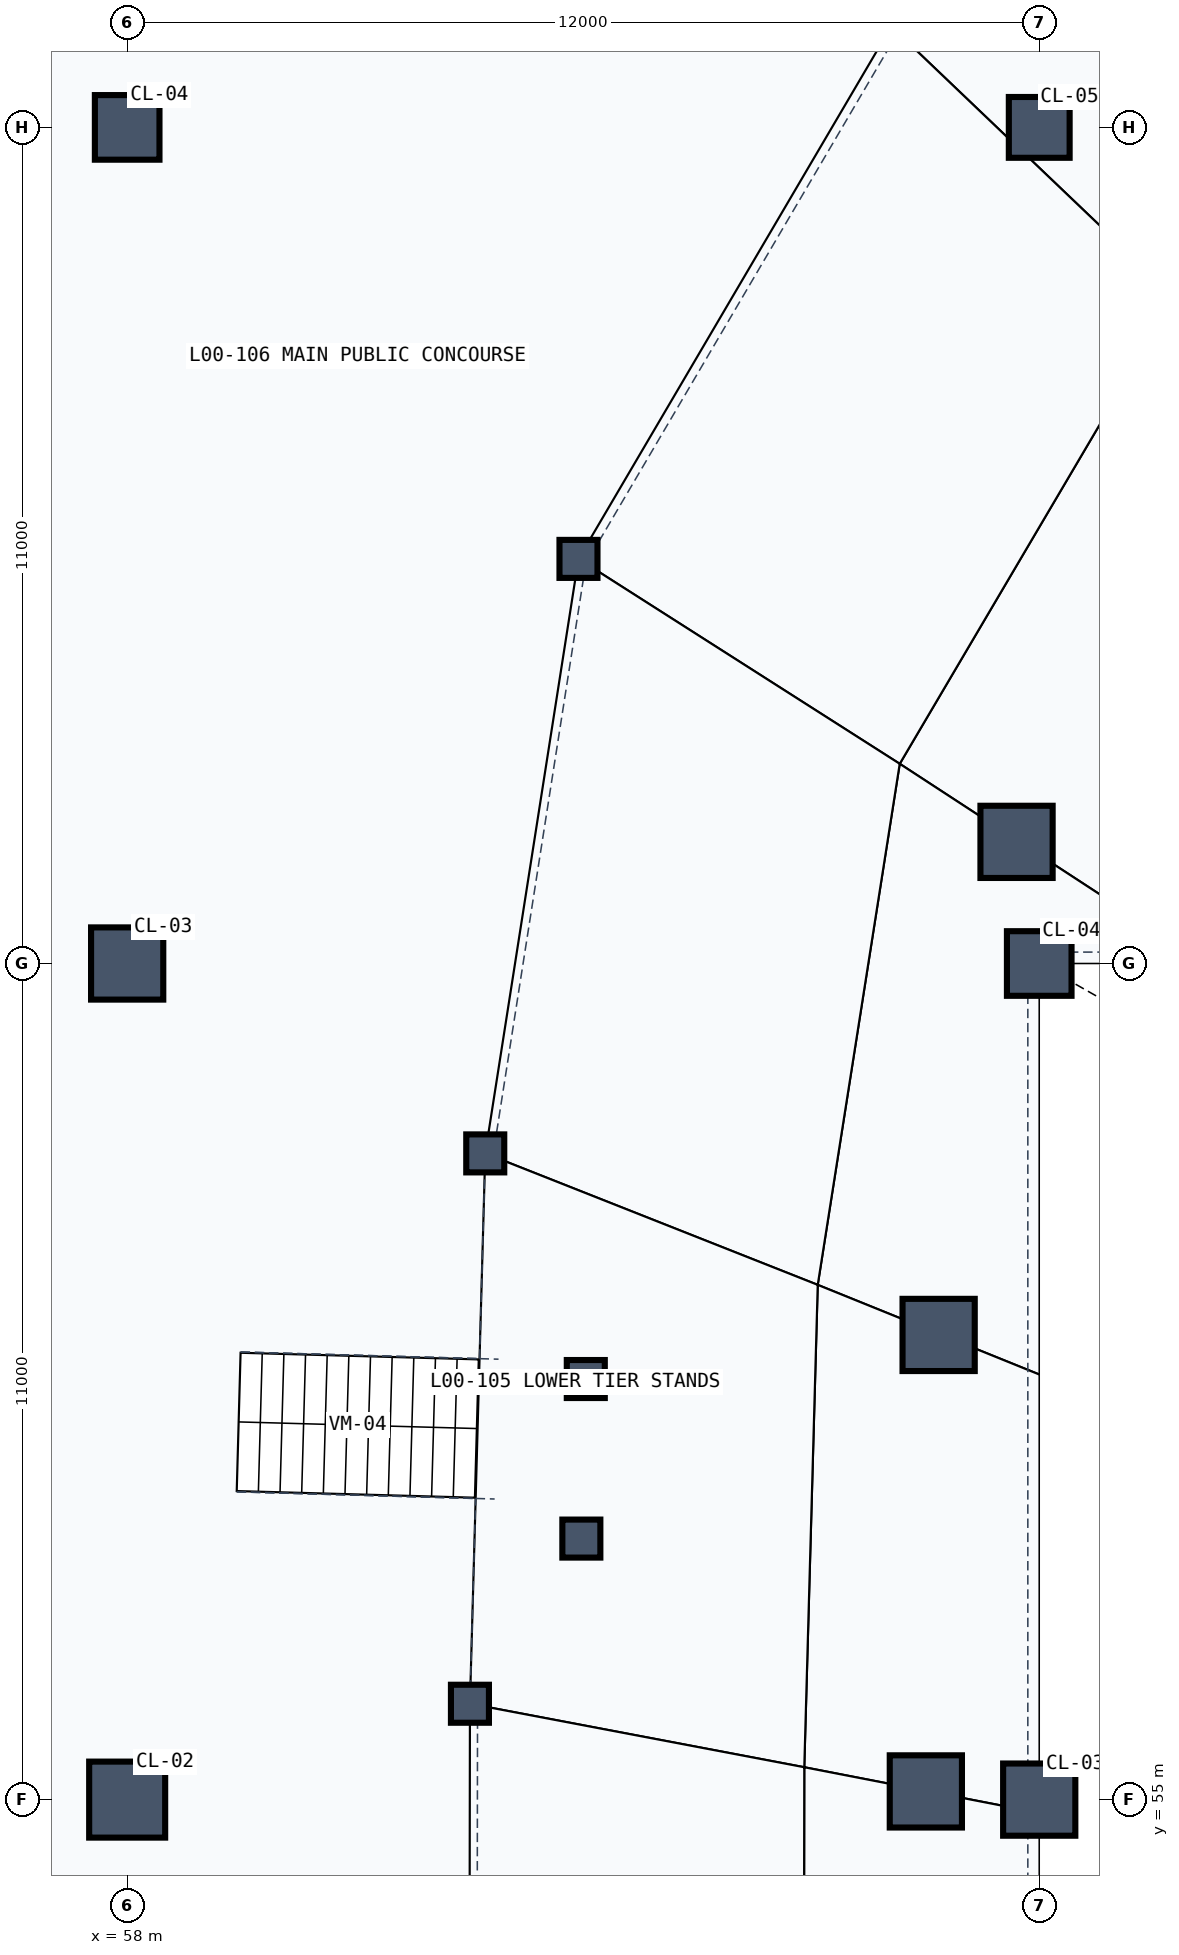
"""IFC4 building model, lengths in metres.
Left out: names, types, materials, properties, quantities, classifications, styles, units other than length and angle.
Written with IfcOpenShell. Run it as: python <this file> out.ifc"""

import sys

from ifc_helpers import new_model, si_unit, direction, frame, origin, origin_2d, place, context, subcontext, project, spatial, rectangle, extrude, element, save


model = new_model("IFC4")
c1 = context("Model", 3, precision=1e-05, world=origin(), true_north=direction((0.0, 1.0)))
c2 = subcontext(c1, "Body", "Model", "MODEL_VIEW")
j1 = project(units=[si_unit("LENGTHUNIT", "METRE"), si_unit("PLANEANGLEUNIT", "RADIAN")], contexts=[c1])
p1 = place(None, origin())
s1 = spatial("IfcSite", under=j1, at=p1, CompositionType="ELEMENT")
p2 = place(p1, origin())
s2 = spatial("IfcBuilding", under=s1, at=p2, CompositionType="ELEMENT")
p3 = place(p2, origin())
s3 = spatial("IfcBuildingStorey", under=s2, at=p3, CompositionType="ELEMENT", Elevation=0.0)
p4 = place(p3, frame((58.0, 55.0, 0.0), z_axis=(0.0, 0.0, 1.0), x_axis=(1.0, 0.0, 0.0)))
e1 = element("IfcColumn", 1, at=p4, inside=s3, PredefinedType="COLUMN", context=c2, shape_type="SweptSolid", body=[
    extrude(rectangle(XDim=1.0, YDim=1.0, at=origin_2d()), origin(), (0.0, 0.0, 1.0), 5.4),
])
p5 = place(p3, frame((58.0, 66.0, 0.0), z_axis=(0.0, 0.0, 1.0), x_axis=(1.0, 0.0, 0.0)))
e2 = element("IfcColumn", 2, at=p5, inside=s3, PredefinedType="COLUMN", context=c2, shape_type="SweptSolid", body=[
    extrude(rectangle(XDim=0.95, YDim=0.95, at=origin_2d()), origin(), (0.0, 0.0, 1.0), 5.4),
])
p6 = place(p3, frame((58.0, 77.0, 0.0), z_axis=(0.0, 0.0, 1.0), x_axis=(1.0, 0.0, 0.0)))
e3 = element("IfcColumn", 3, at=p6, inside=s3, PredefinedType="COLUMN", context=c2, shape_type="SweptSolid", body=[
    extrude(rectangle(XDim=0.85, YDim=0.85, at=origin_2d()), origin(), (0.0, 0.0, 1.0), 5.4),
])
p7 = place(p3, frame((70.0, 55.0, 0.0), z_axis=(0.0, 0.0, 1.0), x_axis=(1.0, 0.0, 0.0)))
e4 = element("IfcColumn", 4, at=p7, inside=s3, PredefinedType="COLUMN", context=c2, shape_type="SweptSolid", body=[
    extrude(rectangle(XDim=0.95, YDim=0.95, at=origin_2d()), origin(), (0.0, 0.0, 1.0), 5.4),
])
p8 = place(p3, frame((70.0, 66.0, 0.0), z_axis=(0.0, 0.0, 1.0), x_axis=(1.0, 0.0, 0.0)))
e5 = element("IfcColumn", 5, at=p8, inside=s3, PredefinedType="COLUMN", context=c2, shape_type="SweptSolid", body=[
    extrude(rectangle(XDim=0.85, YDim=0.85, at=origin_2d()), origin(), (0.0, 0.0, 1.0), 5.4),
])
p9 = place(p3, frame((70.0, 77.0, 0.0), z_axis=(0.0, 0.0, 1.0), x_axis=(1.0, 0.0, 0.0)))
e6 = element("IfcColumn", 6, at=p9, inside=s3, PredefinedType="COLUMN", context=c2, shape_type="SweptSolid", body=[
    extrude(rectangle(XDim=0.8, YDim=0.8, at=origin_2d()), origin(), (0.0, 0.0, 1.0), 5.4),
])
for number, where, z_axis, x_axis in (
    (7, (69.701, 67.6, 0.0), (0.0, 0.0, 1.0), (1.0, 0.0, 0.0)),
    (8, (68.677, 61.113, 0.0), (0.0, 0.0, 1.0), (1.0, 0.0, 0.0)),
    (9, (68.508, 55.108, 0.0), (0.0, 0.0, 1.0), (1.0, 0.0, 0.0)),
):
    element("IfcColumn", number, at=place(p3, frame(where, z_axis=z_axis, x_axis=x_axis)), inside=s3, PredefinedType="COLUMN", context=c2, shape_type="SweptSolid", body=[
        extrude(rectangle(XDim=0.95, YDim=0.95, at=origin_2d()), origin(), (0.0, 0.0, 1.0), 5.4),
    ])
for number, where, z_axis, x_axis in (
    (10, (63.938, 71.323, 0.0), (0.0, 0.0, 1.0), (1.0, 0.0, 0.0)),
    (11, (62.711, 63.502, 0.0), (0.0, 0.0, 1.0), (1.0, 0.0, 0.0)),
):
    element("IfcColumn", number, at=place(p3, frame(where, z_axis=z_axis, x_axis=x_axis)), inside=s3, PredefinedType="COLUMN", context=c2, shape_type="SweptSolid", body=[
        extrude(rectangle(XDim=0.5, YDim=0.5, at=origin_2d()), origin(), (0.0, 0.0, 1.0), 1.28),
    ])
for number, where, z_axis, x_axis in (
    (12, (64.034, 60.533, 0.0), (0.0, 0.0, 1.0), (1.0, 0.0, 0.0)),
    (13, (63.976, 58.434, 0.0), (0.0, 0.0, 1.0), (1.0, 0.0, 0.0)),
):
    element("IfcColumn", number, at=place(p3, frame(where, z_axis=z_axis, x_axis=x_axis)), inside=s3, PredefinedType="COLUMN", context=c2, shape_type="SweptSolid", body=[
        extrude(rectangle(XDim=0.5, YDim=0.5, at=origin_2d()), origin(), (0.0, 0.0, 1.0), 1.05),
    ])
p10 = place(p3, frame((62.51, 56.261, 0.0), z_axis=(0.0, 0.0, 1.0), x_axis=(1.0, 0.0, 0.0)))
e14 = element("IfcColumn", 14, at=p10, inside=s3, PredefinedType="COLUMN", context=c2, shape_type="SweptSolid", body=[
    extrude(rectangle(XDim=0.5, YDim=0.5, at=origin_2d()), origin(), (0.0, 0.0, 1.0), 1.28),
])
save(model, sys.argv[1])
